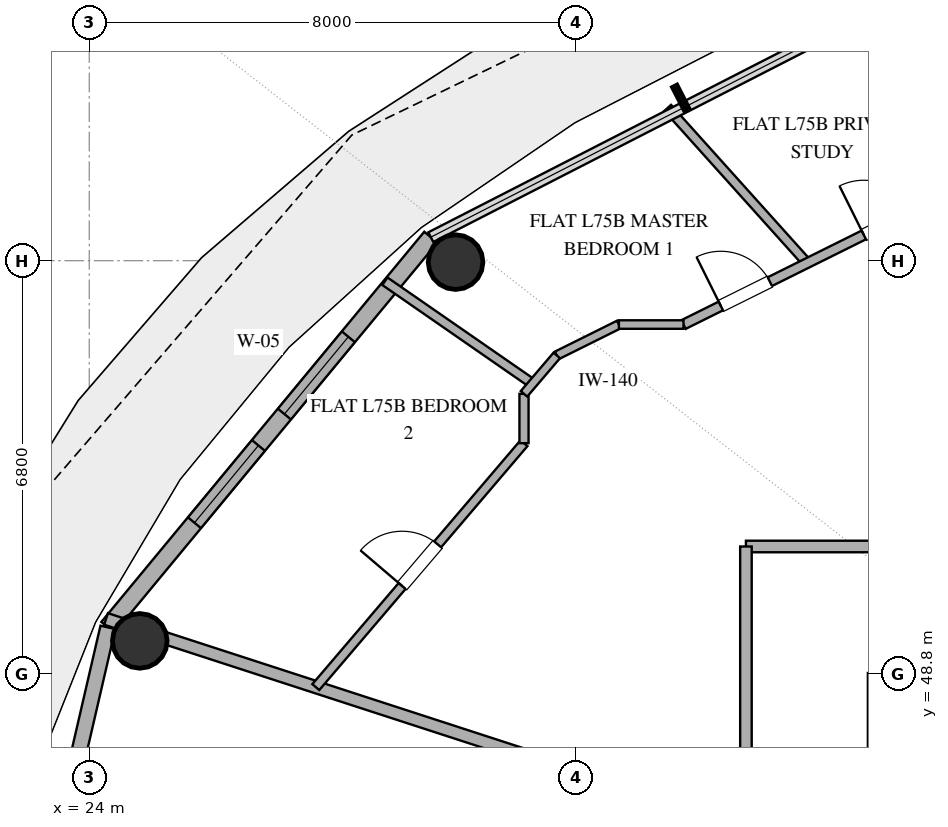
"""IFC4 building model, lengths in metres.
Left out: names, types, materials, properties, quantities, classifications, styles, units other than length and angle.
Written with IfcOpenShell. Run it as: python <this file> out.ifc"""

import sys

from ifc_helpers import new_model, si_unit, direction, frame, frame_2d, origin, origin_2d, place, context, subcontext, project, spatial, rectangle, hollow_circle, extrude, element, fill, save


model = new_model("IFC4")
c1 = context("Model", 3, precision=1e-05, world=origin(), true_north=direction((0.0, 1.0)))
c2 = subcontext(c1, "Body", "Model", "MODEL_VIEW")
j1 = project(units=[si_unit("LENGTHUNIT", "METRE"), si_unit("PLANEANGLEUNIT", "RADIAN")], contexts=[c1])
p1 = place(None, origin())
s1 = spatial("IfcSite", under=j1, at=p1, CompositionType="ELEMENT")
p2 = place(p1, origin())
s2 = spatial("IfcBuilding", under=s1, at=p2, CompositionType="ELEMENT")
p3 = place(p2, frame((0.0, 0.0, 291.0)))
s3 = spatial("IfcBuildingStorey", under=s2, at=p3, CompositionType="ELEMENT", Elevation=291.0)
for number, where, z_axis, x_axis in (
    (1, (30.025, 55.576, 0.0), (0.0, 0.0, 1.0), (1.0, 0.0, 0.0)),
    (2, (24.831, 49.347, 0.0), (0.0, 0.0, 1.0), (1.0, 0.0, 0.0)),
):
    element("IfcColumn", number, at=place(p3, frame(where, z_axis=z_axis, x_axis=x_axis)), inside=s3, PredefinedType="COLUMN", context=c2, shape_type="SweptSolid", body=[
        extrude(hollow_circle(Radius=0.45, WallThickness=0.025, at=origin_2d()), origin(), (0.0, 0.0, 1.0), 3.37),
    ])
p4 = place(p3, frame((29.617, 55.987, 0.0), z_axis=(0.0, 0.0, 1.0), x_axis=(-0.63761509934, -0.770355103243, 0.0)))
e3 = element("IfcWall", 3, at=p4, inside=s3, PredefinedType="SOLIDWALL", context=c2, shape_type="SweptSolid", body=[
    extrude(rectangle(XDim=8.33, YDim=0.28, at=frame_2d((4.165, 0.0))), origin(), (0.0, 0.0, 1.0), 3.37),
])
p5 = place(p4, frame((2.126, 0.0, 0.85)))
e4 = element("IfcOpeningElement", 4, at=p5, cuts=e3, PredefinedType="OPENING", context=c2, shape_type="SweptSolid", body=[
    extrude(rectangle(XDim=1.65, YDim=2.0, at=frame_2d((0.825, 1.0))), frame((0.0, 0.15, 0.0), z_axis=(0.0, -1.0, 0.0), x_axis=(1.0, 0.0, 0.0)), (0.0, 0.0, 1.0), 0.3),
])
p6 = place(p4, frame((4.446, 0.0, 0.85)))
e5 = element("IfcOpeningElement", 5, at=p6, cuts=e3, PredefinedType="OPENING", context=c2, shape_type="SweptSolid", body=[
    extrude(rectangle(XDim=1.65, YDim=2.0, at=frame_2d((0.825, 1.0))), frame((0.0, 0.15, 0.0), z_axis=(0.0, -1.0, 0.0), x_axis=(1.0, 0.0, 0.0)), (0.0, 0.0, 1.0), 0.3),
])
p7 = place(p3, frame((24.306, 49.57, 0.0), z_axis=(0.0, 0.0, 1.0), x_axis=(-0.225635078214, -0.974211892495, 0.0)))
e6 = element("IfcWall", 6, at=p7, inside=s3, PredefinedType="SOLIDWALL", context=c2, shape_type="SweptSolid", body=[
    extrude(rectangle(XDim=7.77, YDim=0.25, at=frame_2d((3.885, 0.0))), origin(), (0.0, 0.0, 1.0), 3.37),
])
p8 = place(p7, frame((5.03, 0.0, 1.42)))
e7 = element("IfcOpeningElement", 7, at=p8, cuts=e6, PredefinedType="OPENING", context=c2, shape_type="SweptSolid", body=[
    extrude(rectangle(XDim=1.0, YDim=1.05, at=frame_2d((0.5, 0.525))), frame((0.0, 0.135, 0.0), z_axis=(0.0, -1.0, 0.0), x_axis=(1.0, 0.0, 0.0)), (0.0, 0.0, 1.0), 0.27),
])
p9 = place(p3, frame((34.8, 50.9, 0.0), z_axis=(0.0, 0.0, 1.0), x_axis=(1.0, 0.0, 0.0)))
e8 = element("IfcWall", 8, at=p9, inside=s3, PredefinedType="PARTITIONING", context=c2, shape_type="SweptSolid", body=[
    extrude(rectangle(XDim=12.921, YDim=0.19, at=frame_2d((6.46, 0.0))), origin(), (0.0, 0.0, 1.0), 2.73),
])
p10 = place(p9, frame((5.707, 0.0, 0.0)))
e9 = element("IfcOpeningElement", 9, at=p10, cuts=e8, PredefinedType="OPENING", context=c2, shape_type="SweptSolid", body=[
    extrude(rectangle(XDim=1.0, YDim=2.2, at=frame_2d((0.5, 1.1))), frame((0.0, 0.105, 0.0), z_axis=(0.0, -1.0, 0.0), x_axis=(1.0, 0.0, 0.0)), (0.0, 0.0, 1.0), 0.21),
])
p11 = place(p3, frame((34.8, 34.0, 0.0), z_axis=(0.0, 0.0, 1.0), x_axis=(0.0, 1.0, 0.0)))
e10 = element("IfcWall", 10, at=p11, inside=s3, PredefinedType="PARTITIONING", context=c2, shape_type="SweptSolid", body=[
    extrude(rectangle(XDim=16.9, YDim=0.19, at=frame_2d((8.45, 0.0))), origin(), (0.0, 0.0, 1.0), 2.73),
])
p12 = place(p11, frame((7.627, 0.0, 0.0)))
e11 = element("IfcOpeningElement", 11, at=p12, cuts=e10, PredefinedType="OPENING", context=c2, shape_type="SweptSolid", body=[
    extrude(rectangle(XDim=1.0, YDim=2.2, at=frame_2d((0.5, 1.1))), frame((0.0, 0.105, 0.0), z_axis=(0.0, -1.0, 0.0), x_axis=(1.0, 0.0, 0.0)), (0.0, 0.0, 1.0), 0.21),
])
p13 = place(p3, frame((24.276, 49.708, 0.0), z_axis=(0.0, 0.0, 1.0), x_axis=(0.951054334328, -0.309023709699, 0.0)))
e12 = element("IfcWall", 12, at=p13, inside=s3, PredefinedType="PARTITIONING", context=c2, shape_type="SweptSolid", body=[
    extrude(rectangle(XDim=11.065, YDim=0.2, at=frame_2d((5.533, 0.0))), origin(), (0.0, 0.0, 1.0), 2.73),
])
p14 = place(p3, frame((27.726, 48.587, 0.0), z_axis=(0.0, 0.0, 1.0), x_axis=(0.649196412447, 0.760620810961, 0.0)))
e13 = element("IfcWall", 13, at=p14, inside=s3, PredefinedType="PARTITIONING", context=c2, shape_type="SweptSolid", body=[
    extrude(rectangle(XDim=5.274, YDim=0.15, at=frame_2d((2.637, 0.0))), origin(), (0.0, 0.0, 1.0), 2.73),
])
p15 = place(p14, frame((2.187, 0.0, 0.0)))
e14 = element("IfcOpeningElement", 14, at=p15, cuts=e13, PredefinedType="OPENING", context=c2, shape_type="SweptSolid", body=[
    extrude(rectangle(XDim=0.9, YDim=2.1, at=frame_2d((0.45, 1.05))), frame((0.0, 0.085, 0.0), z_axis=(0.0, -1.0, 0.0), x_axis=(1.0, 0.0, 0.0)), (0.0, 0.0, 1.0), 0.17),
])
p16 = place(p3, frame((35.807, 55.561, 0.0), z_axis=(0.0, 0.0, 1.0), x_axis=(-0.668618761853, 0.743605373365, 0.0)))
e15 = element("IfcWall", 15, at=p16, inside=s3, PredefinedType="PARTITIONING", context=c2, shape_type="SweptSolid", body=[
    extrude(rectangle(XDim=3.432, YDim=0.15, at=frame_2d((1.716, 0.0))), origin(), (0.0, 0.0, 1.0), 2.73),
])
p17 = place(p3, frame((38.477, 56.887, 0.0), z_axis=(0.0, 0.0, 1.0), x_axis=(-0.538850350107, 0.842401507709, 0.0)))
e16 = element("IfcWall", 16, at=p17, inside=s3, PredefinedType="PLUMBINGWALL", context=c2, shape_type="SweptSolid", body=[
    extrude(rectangle(XDim=3.373, YDim=0.16, at=frame_2d((1.687, 0.0))), origin(), (0.0, 0.0, 1.0), 2.73),
])
p18 = place(p3, frame((33.773, 54.55, 0.0), z_axis=(0.0, 0.0, 1.0), x_axis=(0.895562239868, 0.444936258943, 0.0)))
e17 = element("IfcWall", 17, at=p18, inside=s3, PredefinedType="PLUMBINGWALL", context=c2, shape_type="SweptSolid", body=[
    extrude(rectangle(XDim=6.222, YDim=0.16, at=frame_2d((3.111, 0.0))), origin(), (0.0, 0.0, 1.0), 2.73),
])
p19 = place(p18, frame((3.311, 0.0, 0.0)))
e18 = element("IfcOpeningElement", 18, at=p19, cuts=e17, PredefinedType="OPENING", context=c2, shape_type="SweptSolid", body=[
    extrude(rectangle(XDim=0.9, YDim=2.1, at=frame_2d((0.45, 1.05))), frame((0.0, 0.09, 0.0), z_axis=(0.0, -1.0, 0.0), x_axis=(1.0, 0.0, 0.0)), (0.0, 0.0, 1.0), 0.18),
])
p20 = place(p18, frame((0.686, 0.0, 0.0)))
e19 = element("IfcOpeningElement", 19, at=p20, cuts=e17, PredefinedType="OPENING", context=c2, shape_type="SweptSolid", body=[
    extrude(rectangle(XDim=0.9, YDim=2.1, at=frame_2d((0.45, 1.05))), frame((0.0, 0.09, 0.0), z_axis=(0.0, -1.0, 0.0), x_axis=(1.0, 0.0, 0.0)), (0.0, 0.0, 1.0), 0.18),
])
p21 = place(p3, frame((31.293, 53.578, 0.0), z_axis=(0.0, 0.0, 1.0), x_axis=(-0.821957300328, 0.569549116792, 0.0)))
e20 = element("IfcWall", 20, at=p21, inside=s3, PredefinedType="PARTITIONING", context=c2, shape_type="SweptSolid", body=[
    extrude(rectangle(XDim=2.957, YDim=0.15, at=frame_2d((1.479, 0.0))), origin(), (0.0, 0.0, 1.0), 2.73),
])
p22 = place(p3, frame((32.711, 54.55, 0.0), z_axis=(0.0, 0.0, 1.0), x_axis=(-0.895409226325, -0.445244109912, 0.0)))
e21 = element("IfcWall", 21, at=p22, inside=s3, PredefinedType="PARTITIONING", context=c2, shape_type="SweptSolid", body=[
    extrude(rectangle(XDim=1.141, YDim=0.14, at=frame_2d((0.571, 0.0))), origin(), (0.0, 0.0, 1.0), 2.73),
])
p23 = place(p3, frame((33.773, 54.55, 0.0), z_axis=(0.0, 0.0, 1.0), x_axis=(-1.0, 0.0, 0.0)))
e22 = element("IfcWall", 22, at=p23, inside=s3, PredefinedType="PARTITIONING", context=c2, shape_type="SweptSolid", body=[
    extrude(rectangle(XDim=1.062, YDim=0.14, at=frame_2d((0.531, 0.0))), origin(), (0.0, 0.0, 1.0), 2.73),
])
p24 = place(p3, frame((31.15, 52.599, 0.0), z_axis=(0.0, 0.0, 1.0), x_axis=(0.0, 1.0, 0.0)))
e23 = element("IfcWall", 23, at=p24, inside=s3, PredefinedType="PARTITIONING", context=c2, shape_type="SweptSolid", body=[
    extrude(rectangle(XDim=0.812, YDim=0.15, at=frame_2d((0.406, 0.0))), origin(), (0.0, 0.0, 1.0), 2.73),
])
p25 = place(p3, frame((31.689, 54.042, 0.0), z_axis=(0.0, 0.0, 1.0), x_axis=(-0.649191857323, -0.760624698774, 0.0)))
e24 = element("IfcWall", 24, at=p25, inside=s3, PredefinedType="PARTITIONING", context=c2, shape_type="SweptSolid", body=[
    extrude(rectangle(XDim=0.83, YDim=0.14, at=frame_2d((0.415, 0.0))), origin(), (0.0, 0.0, 1.0), 2.73),
])
p26 = place(p5, origin())
e25 = element("IfcWindow", 25, at=p26, inside=s3, PartitioningType="SINGLE_PANEL", PredefinedType="WINDOW", context=c2, shape_type="SweptSolid", body=[
    extrude(rectangle(XDim=1.65, YDim=2.0, at=frame_2d((0.825, 1.0))), frame((0.0, 0.03, 0.0), z_axis=(0.0, -1.0, 0.0), x_axis=(1.0, 0.0, 0.0)), (0.0, 0.0, 1.0), 0.06),
])
fill(e4, e25)
p27 = place(p6, origin())
e26 = element("IfcWindow", 26, at=p27, inside=s3, PartitioningType="SINGLE_PANEL", PredefinedType="WINDOW", context=c2, shape_type="SweptSolid", body=[
    extrude(rectangle(XDim=1.65, YDim=2.0, at=frame_2d((0.825, 1.0))), frame((0.0, 0.03, 0.0), z_axis=(0.0, -1.0, 0.0), x_axis=(1.0, 0.0, 0.0)), (0.0, 0.0, 1.0), 0.06),
])
fill(e5, e26)
p28 = place(p15, origin())
e27 = element("IfcDoor", 27, at=p28, inside=s3, OperationType="SINGLE_SWING_LEFT", PredefinedType="DOOR", context=c2, shape_type="SweptSolid", body=[
    extrude(rectangle(XDim=0.9, YDim=2.1, at=frame_2d((0.45, 1.05))), frame((0.0, 0.025, 0.0), z_axis=(0.0, -1.0, 0.0), x_axis=(1.0, 0.0, 0.0)), (0.0, 0.0, 1.0), 0.05),
])
fill(e14, e27)
p29 = place(p19, origin())
e28 = element("IfcDoor", 28, at=p29, inside=s3, OperationType="SINGLE_SWING_LEFT", PredefinedType="DOOR", context=c2, shape_type="SweptSolid", body=[
    extrude(rectangle(XDim=0.9, YDim=2.1, at=frame_2d((0.45, 1.05))), frame((0.0, 0.025, 0.0), z_axis=(0.0, -1.0, 0.0), x_axis=(1.0, 0.0, 0.0)), (0.0, 0.0, 1.0), 0.05),
])
fill(e18, e28)
p30 = place(p20, origin())
e29 = element("IfcDoor", 29, at=p30, inside=s3, OperationType="SINGLE_SWING_LEFT", PredefinedType="DOOR", context=c2, shape_type="SweptSolid", body=[
    extrude(rectangle(XDim=0.9, YDim=2.1, at=frame_2d((0.45, 1.05))), frame((0.0, 0.025, 0.0), z_axis=(0.0, -1.0, 0.0), x_axis=(1.0, 0.0, 0.0)), (0.0, 0.0, 1.0), 0.05),
])
fill(e19, e29)
save(model, sys.argv[1])
